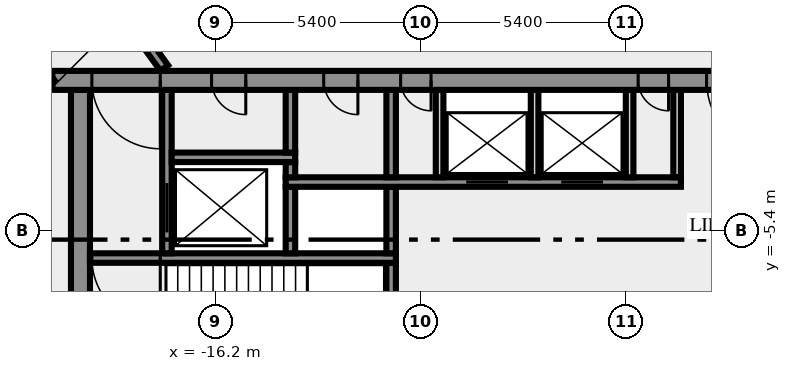
"""IFC4 building model, lengths in metres.
Left out: names, types, materials, properties, quantities, classifications, styles, units other than length and angle.
Written with IfcOpenShell. Run it as: python <this file> out.ifc"""

import sys

from ifc_helpers import new_model, si_unit, direction, frame, frame_2d, origin, place, context, subcontext, project, spatial, rectangle, extrude, element, fill, save


model = new_model("IFC4")
c1 = context("Model", 3, precision=1e-05, world=origin(), true_north=direction((0.0, 1.0)))
c2 = subcontext(c1, "Body", "Model", "MODEL_VIEW")
j1 = project(units=[si_unit("LENGTHUNIT", "METRE"), si_unit("PLANEANGLEUNIT", "RADIAN")], contexts=[c1])
p1 = place(None, origin())
s1 = spatial("IfcSite", under=j1, at=p1, CompositionType="ELEMENT")
p2 = place(p1, origin())
s2 = spatial("IfcBuilding", under=s1, at=p2, CompositionType="ELEMENT")
p3 = place(p2, frame((0.0, 0.0, 311.0)))
s3 = spatial("IfcBuildingStorey", under=s2, at=p3, CompositionType="ELEMENT", Elevation=311.0)
p4 = place(p3, frame((-19.75, -10.5, 0.0), z_axis=(0.0, 0.0, 1.0), x_axis=(0.0, 1.0, 0.0)))
e1 = element("IfcWall", 1, at=p4, inside=s3, PredefinedType="SHEAR", context=c2, shape_type="SweptSolid", body=[
    extrude(rectangle(XDim=8.8, YDim=0.5, at=frame_2d((4.4, 0.0))), origin(), (0.0, 0.0, 1.0), 3.65),
])
p5 = place(p3, frame((-11.575, -7.25, 0.0), z_axis=(0.0, 0.0, 1.0), x_axis=(0.0, 1.0, 0.0)))
e2 = element("IfcWall", 2, at=p5, inside=s3, PredefinedType="SHEAR", context=c2, shape_type="SweptSolid", body=[
    extrude(rectangle(XDim=1.0, YDim=0.25, at=frame_2d((0.5, 0.0))), origin(), (0.0, 0.0, 1.0), 3.65),
])
p6 = place(p3, frame((-11.45, -6.125, 0.0), z_axis=(0.0, 0.0, 1.0), x_axis=(-1.0, 0.0, 0.0)))
e3 = element("IfcWall", 3, at=p6, inside=s3, PredefinedType="SHEAR", context=c2, shape_type="SweptSolid", body=[
    extrude(rectangle(XDim=8.05, YDim=0.25, at=frame_2d((4.025, 0.0))), origin(), (0.0, 0.0, 1.0), 3.65),
])
p7 = place(p6, frame((6.2, 0.0, 0.0)))
e4 = element("IfcOpeningElement", 4, at=p7, cuts=e3, PredefinedType="OPENING", context=c2, shape_type="SweptSolid", body=[
    extrude(rectangle(XDim=1.8, YDim=2.1, at=frame_2d((0.9, 1.05))), frame((0.0, 0.135, 0.0), z_axis=(0.0, -1.0, 0.0), x_axis=(1.0, 0.0, 0.0)), (0.0, 0.0, 1.0), 0.27),
])
p8 = place(p3, frame((-17.475, -6.0, 0.0), z_axis=(0.0, 0.0, 1.0), x_axis=(0.0, 1.0, 0.0)))
e5 = element("IfcWall", 5, at=p8, inside=s3, PredefinedType="SHEAR", context=c2, shape_type="SweptSolid", body=[
    extrude(rectangle(XDim=4.3, YDim=0.25, at=frame_2d((2.15, 0.0))), origin(), (0.0, 0.0, 1.0), 3.65),
])
p9 = place(p8, frame((0.55, 0.0, 0.0)))
e6 = element("IfcOpeningElement", 6, at=p9, cuts=e5, PredefinedType="OPENING", context=c2, shape_type="SweptSolid", body=[
    extrude(rectangle(XDim=1.3, YDim=2.1, at=frame_2d((0.65, 1.05))), frame((0.0, 0.135, 0.0), z_axis=(0.0, -1.0, 0.0), x_axis=(1.0, 0.0, 0.0)), (0.0, 0.0, 1.0), 0.27),
])
for number, where, z_axis, x_axis in (
    (7, (-14.225, -6.0, 0.0), (0.0, 0.0, 1.0), (0.0, 1.0, 0.0)),
    (8, (-11.575, -6.0, 0.0), (0.0, 0.0, 1.0), (0.0, 1.0, 0.0)),
):
    element("IfcWall", number, at=place(p3, frame(where, z_axis=z_axis, x_axis=x_axis)), inside=s3, PredefinedType="SHEAR", context=c2, shape_type="SweptSolid", body=[
        extrude(rectangle(XDim=1.75, YDim=0.25, at=frame_2d((0.875, 0.0))), origin(), (0.0, 0.0, 1.0), 3.65),
    ])
p10 = place(p3, frame((-14.35, -4.125, 0.0), z_axis=(0.0, 0.0, 1.0), x_axis=(1.0, 0.0, 0.0)))
e9 = element("IfcWall", 9, at=p10, inside=s3, PredefinedType="SHEAR", context=c2, shape_type="SweptSolid", body=[
    extrude(rectangle(XDim=10.4, YDim=0.25, at=frame_2d((5.2, 0.0))), origin(), (0.0, 0.0, 1.0), 3.65),
])
p11 = place(p10, frame((4.75, 0.0, 0.0)))
e10 = element("IfcOpeningElement", 10, at=p11, cuts=e9, PredefinedType="OPENING", context=c2, shape_type="SweptSolid", body=[
    extrude(rectangle(XDim=1.1, YDim=2.1, at=frame_2d((0.55, 1.05))), frame((0.0, 0.135, 0.0), z_axis=(0.0, -1.0, 0.0), x_axis=(1.0, 0.0, 0.0)), (0.0, 0.0, 1.0), 0.27),
])
p12 = place(p10, frame((7.25, 0.0, 0.0)))
e11 = element("IfcOpeningElement", 11, at=p12, cuts=e9, PredefinedType="OPENING", context=c2, shape_type="SweptSolid", body=[
    extrude(rectangle(XDim=1.1, YDim=2.1, at=frame_2d((0.55, 1.05))), frame((0.0, 0.135, 0.0), z_axis=(0.0, -1.0, 0.0), x_axis=(1.0, 0.0, 0.0)), (0.0, 0.0, 1.0), 0.27),
])
p13 = place(p3, frame((-14.225, -4.0, 0.0), z_axis=(0.0, 0.0, 1.0), x_axis=(0.0, 1.0, 0.0)))
e12 = element("IfcWall", 12, at=p13, inside=s3, PredefinedType="SHEAR", context=c2, shape_type="SweptSolid", body=[
    extrude(rectangle(XDim=0.4, YDim=0.25, at=frame_2d((0.2, 0.0))), origin(), (0.0, 0.0, 1.0), 3.65),
])
p14 = place(p3, frame((-11.575, -4.0, 0.0), z_axis=(0.0, 0.0, 1.0), x_axis=(0.0, 1.0, 0.0)))
e13 = element("IfcWall", 13, at=p14, inside=s3, PredefinedType="SHEAR", context=c2, shape_type="SweptSolid", body=[
    extrude(rectangle(XDim=2.3, YDim=0.25, at=frame_2d((1.15, 0.0))), origin(), (0.0, 0.0, 1.0), 3.65),
])
for number, where, z_axis, x_axis in (
    (14, (-10.3, -4.0, 0.0), (0.0, 0.0, 1.0), (0.0, 1.0, 0.0)),
    (15, (-7.8, -4.0, 0.0), (0.0, 0.0, 1.0), (0.0, 1.0, 0.0)),
    (16, (-5.3, -4.0, 0.0), (0.0, 0.0, 1.0), (0.0, 1.0, 0.0)),
    (17, (-4.05, -4.0, 0.0), (0.0, 0.0, 1.0), (0.0, 1.0, 0.0)),
):
    element("IfcWall", number, at=place(p3, frame(where, z_axis=z_axis, x_axis=x_axis)), inside=s3, PredefinedType="SOLIDWALL", context=c2, shape_type="SweptSolid", body=[
        extrude(rectangle(XDim=2.3, YDim=0.2, at=frame_2d((1.15, 0.0))), origin(), (0.0, 0.0, 1.0), 3.65),
    ])
p15 = place(p3, frame((-17.35, -3.475, 0.0), z_axis=(0.0, 0.0, 1.0), x_axis=(1.0, 0.0, 0.0)))
e18 = element("IfcWall", 18, at=p15, inside=s3, PredefinedType="SHEAR", context=c2, shape_type="SweptSolid", body=[
    extrude(rectangle(XDim=3.25, YDim=0.25, at=frame_2d((1.625, 0.0))), origin(), (0.0, 0.0, 1.0), 3.65),
])
p16 = place(p3, frame((-14.225, -3.35, 0.0), z_axis=(0.0, 0.0, 1.0), x_axis=(0.0, 1.0, 0.0)))
e19 = element("IfcWall", 19, at=p16, inside=s3, PredefinedType="SHEAR", context=c2, shape_type="SweptSolid", body=[
    extrude(rectangle(XDim=1.65, YDim=0.25, at=frame_2d((0.825, 0.0))), origin(), (0.0, 0.0, 1.0), 3.65),
])
p17 = place(p3, frame((20.49, -1.45, 0.0), z_axis=(0.0, 0.0, 1.0), x_axis=(-1.0, 0.0, 0.0)))
e20 = element("IfcWall", 20, at=p17, inside=s3, PredefinedType="SHEAR", context=c2, shape_type="SweptSolid", body=[
    extrude(rectangle(XDim=40.98, YDim=0.5, at=frame_2d((20.49, 0.0))), origin(), (0.0, 0.0, 1.0), 3.65),
])
p18 = place(p17, frame((38.14, 0.0, 0.0)))
e21 = element("IfcOpeningElement", 21, at=p18, cuts=e20, PredefinedType="OPENING", context=c2, shape_type="SweptSolid", body=[
    extrude(rectangle(XDim=1.8, YDim=2.1, at=frame_2d((0.9, 1.05))), frame((0.0, 0.26, 0.0), z_axis=(0.0, -1.0, 0.0), x_axis=(1.0, 0.0, 0.0)), (0.0, 0.0, 1.0), 0.52),
])
p19 = place(p17, frame((35.89, 0.0, 0.0)))
e22 = element("IfcOpeningElement", 22, at=p19, cuts=e20, PredefinedType="OPENING", context=c2, shape_type="SweptSolid", body=[
    extrude(rectangle(XDim=0.9, YDim=2.1, at=frame_2d((0.45, 1.05))), frame((0.0, 0.26, 0.0), z_axis=(0.0, -1.0, 0.0), x_axis=(1.0, 0.0, 0.0)), (0.0, 0.0, 1.0), 0.52),
])
p20 = place(p17, frame((32.94, 0.0, 0.0)))
e23 = element("IfcOpeningElement", 23, at=p20, cuts=e20, PredefinedType="OPENING", context=c2, shape_type="SweptSolid", body=[
    extrude(rectangle(XDim=0.9, YDim=2.1, at=frame_2d((0.45, 1.05))), frame((0.0, 0.26, 0.0), z_axis=(0.0, -1.0, 0.0), x_axis=(1.0, 0.0, 0.0)), (0.0, 0.0, 1.0), 0.52),
])
p21 = place(p17, frame((31.015, 0.0, 0.0)))
e24 = element("IfcOpeningElement", 24, at=p21, cuts=e20, PredefinedType="OPENING", context=c2, shape_type="SweptSolid", body=[
    extrude(rectangle(XDim=0.8, YDim=2.1, at=frame_2d((0.4, 1.05))), frame((0.0, 0.26, 0.0), z_axis=(0.0, -1.0, 0.0), x_axis=(1.0, 0.0, 0.0)), (0.0, 0.0, 1.0), 0.52),
])
p22 = place(p17, frame((24.765, 0.0, 0.0)))
e25 = element("IfcOpeningElement", 25, at=p22, cuts=e20, PredefinedType="OPENING", context=c2, shape_type="SweptSolid", body=[
    extrude(rectangle(XDim=0.8, YDim=2.1, at=frame_2d((0.4, 1.05))), frame((0.0, 0.26, 0.0), z_axis=(0.0, -1.0, 0.0), x_axis=(1.0, 0.0, 0.0)), (0.0, 0.0, 1.0), 0.52),
])
p23 = place(p17, frame((21.765, 0.0, 0.0)))
e26 = element("IfcOpeningElement", 26, at=p23, cuts=e20, PredefinedType="OPENING", context=c2, shape_type="SweptSolid", body=[
    extrude(rectangle(XDim=2.0, YDim=2.1, at=frame_2d((1.0, 1.05))), frame((0.0, 0.26, 0.0), z_axis=(0.0, -1.0, 0.0), x_axis=(1.0, 0.0, 0.0)), (0.0, 0.0, 1.0), 0.52),
])
p24 = place(p17, frame((12.24, 0.0, 0.0)))
e27 = element("IfcOpeningElement", 27, at=p24, cuts=e20, PredefinedType="OPENING", context=c2, shape_type="SweptSolid", body=[
    extrude(rectangle(XDim=0.9, YDim=2.1, at=frame_2d((0.45, 1.05))), frame((0.0, 0.26, 0.0), z_axis=(0.0, -1.0, 0.0), x_axis=(1.0, 0.0, 0.0)), (0.0, 0.0, 1.0), 0.52),
])
p25 = place(p17, frame((7.14, 0.0, 0.0)))
e28 = element("IfcOpeningElement", 28, at=p25, cuts=e20, PredefinedType="OPENING", context=c2, shape_type="SweptSolid", body=[
    extrude(rectangle(XDim=0.9, YDim=2.1, at=frame_2d((0.45, 1.05))), frame((0.0, 0.26, 0.0), z_axis=(0.0, -1.0, 0.0), x_axis=(1.0, 0.0, 0.0)), (0.0, 0.0, 1.0), 0.52),
])
p26 = place(p17, frame((5.028, 0.0, 0.0)))
e29 = element("IfcOpeningElement", 29, at=p26, cuts=e20, PredefinedType="OPENING", context=c2, shape_type="SweptSolid", body=[
    extrude(rectangle(XDim=0.8, YDim=2.1, at=frame_2d((0.4, 1.05))), frame((0.0, 0.26, 0.0), z_axis=(0.0, -1.0, 0.0), x_axis=(1.0, 0.0, 0.0)), (0.0, 0.0, 1.0), 0.52),
])
p27 = place(p17, frame((3.452, 0.0, 0.0)))
e30 = element("IfcOpeningElement", 30, at=p27, cuts=e20, PredefinedType="OPENING", context=c2, shape_type="SweptSolid", body=[
    extrude(rectangle(XDim=0.8, YDim=2.1, at=frame_2d((0.4, 1.05))), frame((0.0, 0.26, 0.0), z_axis=(0.0, -1.0, 0.0), x_axis=(1.0, 0.0, 0.0)), (0.0, 0.0, 1.0), 0.52),
])
p28 = place(p17, frame((1.04, 0.0, 0.0)))
e31 = element("IfcOpeningElement", 31, at=p28, cuts=e20, PredefinedType="OPENING", context=c2, shape_type="SweptSolid", body=[
    extrude(rectangle(XDim=1.8, YDim=2.1, at=frame_2d((0.9, 1.05))), frame((0.0, 0.26, 0.0), z_axis=(0.0, -1.0, 0.0), x_axis=(1.0, 0.0, 0.0)), (0.0, 0.0, 1.0), 0.52),
])
p29 = place(p3, frame((-20.531, -1.523, 0.0), z_axis=(0.0, 0.0, 1.0), x_axis=(-0.587785867777, 0.809016547199, 0.0)))
e32 = element("IfcWall", 32, at=p29, inside=s3, PredefinedType="SOLIDWALL", context=c2, shape_type="SweptSolid", body=[
    extrude(rectangle(XDim=16.67, YDim=0.25, at=frame_2d((8.335, 0.0))), origin(), (0.0, 0.0, 1.0), 3.65),
])
p30 = place(p29, frame((15.296, 0.0, 0.0)))
e33 = element("IfcOpeningElement", 33, at=p30, cuts=e32, PredefinedType="OPENING", context=c2, shape_type="SweptSolid", body=[
    extrude(rectangle(XDim=0.9, YDim=2.1, at=frame_2d((0.45, 1.05))), frame((0.0, 0.135, 0.0), z_axis=(0.0, -1.0, 0.0), x_axis=(1.0, 0.0, 0.0)), (0.0, 0.0, 1.0), 0.27),
])
p31 = place(p3, frame((-28.039, 13.319, 0.0), z_axis=(0.0, 0.0, 1.0), x_axis=(0.587791911753, -0.809012155952, 0.0)))
e34 = element("IfcWall", 34, at=p31, inside=s3, PredefinedType="SOLIDWALL", context=c2, shape_type="SweptSolid", body=[
    extrude(rectangle(XDim=17.853, YDim=0.25, at=frame_2d((8.927, 0.0))), origin(), (0.0, 0.0, 1.0), 3.65),
])
p32 = place(p31, frame((13.512, 0.0, 0.0)))
e35 = element("IfcOpeningElement", 35, at=p32, cuts=e34, PredefinedType="OPENING", context=c2, shape_type="SweptSolid", body=[
    extrude(rectangle(XDim=0.9, YDim=2.1, at=frame_2d((0.45, 1.05))), frame((0.0, 0.135, 0.0), z_axis=(0.0, -1.0, 0.0), x_axis=(1.0, 0.0, 0.0)), (0.0, 0.0, 1.0), 0.27),
])
p33 = place(p7, origin())
e36 = element("IfcDoor", 36, at=p33, inside=s3, OperationType="DOUBLE_DOOR_SINGLE_SWING", PredefinedType="DOOR", context=c2, shape_type="SweptSolid", body=[
    extrude(rectangle(XDim=1.8, YDim=2.1, at=frame_2d((0.9, 1.05))), frame((0.0, 0.025, 0.0), z_axis=(0.0, -1.0, 0.0), x_axis=(1.0, 0.0, 0.0)), (0.0, 0.0, 1.0), 0.05),
])
fill(e4, e36)
p34 = place(p9, origin())
e37 = element("IfcDoor", 37, at=p34, inside=s3, OperationType="DOUBLE_DOOR_SLIDING", PredefinedType="DOOR", context=c2, shape_type="SweptSolid", body=[
    extrude(rectangle(XDim=1.3, YDim=2.1, at=frame_2d((0.65, 1.05))), frame((0.0, 0.025, 0.0), z_axis=(0.0, -1.0, 0.0), x_axis=(1.0, 0.0, 0.0)), (0.0, 0.0, 1.0), 0.05),
])
fill(e6, e37)
p35 = place(p11, origin())
e38 = element("IfcDoor", 38, at=p35, inside=s3, OperationType="DOUBLE_DOOR_SLIDING", PredefinedType="DOOR", context=c2, shape_type="SweptSolid", body=[
    extrude(rectangle(XDim=1.1, YDim=2.1, at=frame_2d((0.55, 1.05))), frame((0.0, 0.025, 0.0), z_axis=(0.0, -1.0, 0.0), x_axis=(1.0, 0.0, 0.0)), (0.0, 0.0, 1.0), 0.05),
])
fill(e10, e38)
p36 = place(p12, origin())
e39 = element("IfcDoor", 39, at=p36, inside=s3, OperationType="DOUBLE_DOOR_SLIDING", PredefinedType="DOOR", context=c2, shape_type="SweptSolid", body=[
    extrude(rectangle(XDim=1.1, YDim=2.1, at=frame_2d((0.55, 1.05))), frame((0.0, 0.025, 0.0), z_axis=(0.0, -1.0, 0.0), x_axis=(1.0, 0.0, 0.0)), (0.0, 0.0, 1.0), 0.05),
])
fill(e11, e39)
p37 = place(p18, origin())
e40 = element("IfcDoor", 40, at=p37, inside=s3, OperationType="DOUBLE_DOOR_SINGLE_SWING", PredefinedType="DOOR", context=c2, shape_type="SweptSolid", body=[
    extrude(rectangle(XDim=1.8, YDim=2.1, at=frame_2d((0.9, 1.05))), frame((0.0, 0.025, 0.0), z_axis=(0.0, -1.0, 0.0), x_axis=(1.0, 0.0, 0.0)), (0.0, 0.0, 1.0), 0.05),
])
fill(e21, e40)
p38 = place(p19, origin())
e41 = element("IfcDoor", 41, at=p38, inside=s3, OperationType="SINGLE_SWING_RIGHT", PredefinedType="DOOR", context=c2, shape_type="SweptSolid", body=[
    extrude(rectangle(XDim=0.9, YDim=2.1, at=frame_2d((0.45, 1.05))), frame((0.0, 0.025, 0.0), z_axis=(0.0, -1.0, 0.0), x_axis=(1.0, 0.0, 0.0)), (0.0, 0.0, 1.0), 0.05),
])
fill(e22, e41)
p39 = place(p20, origin())
e42 = element("IfcDoor", 42, at=p39, inside=s3, OperationType="SINGLE_SWING_RIGHT", PredefinedType="DOOR", context=c2, shape_type="SweptSolid", body=[
    extrude(rectangle(XDim=0.9, YDim=2.1, at=frame_2d((0.45, 1.05))), frame((0.0, 0.025, 0.0), z_axis=(0.0, -1.0, 0.0), x_axis=(1.0, 0.0, 0.0)), (0.0, 0.0, 1.0), 0.05),
])
fill(e23, e42)
p40 = place(p21, origin())
e43 = element("IfcDoor", 43, at=p40, inside=s3, OperationType="SINGLE_SWING_RIGHT", PredefinedType="DOOR", context=c2, shape_type="SweptSolid", body=[
    extrude(rectangle(XDim=0.8, YDim=2.1, at=frame_2d((0.4, 1.05))), frame((0.0, 0.025, 0.0), z_axis=(0.0, -1.0, 0.0), x_axis=(1.0, 0.0, 0.0)), (0.0, 0.0, 1.0), 0.05),
])
fill(e24, e43)
p41 = place(p22, origin())
e44 = element("IfcDoor", 44, at=p41, inside=s3, OperationType="SINGLE_SWING_RIGHT", PredefinedType="DOOR", context=c2, shape_type="SweptSolid", body=[
    extrude(rectangle(XDim=0.8, YDim=2.1, at=frame_2d((0.4, 1.05))), frame((0.0, 0.025, 0.0), z_axis=(0.0, -1.0, 0.0), x_axis=(1.0, 0.0, 0.0)), (0.0, 0.0, 1.0), 0.05),
])
fill(e25, e44)
p42 = place(p23, origin())
e45 = element("IfcDoor", 45, at=p42, inside=s3, OperationType="DOUBLE_DOOR_SINGLE_SWING", PredefinedType="DOOR", context=c2, shape_type="SweptSolid", body=[
    extrude(rectangle(XDim=2.0, YDim=2.1, at=frame_2d((1.0, 1.05))), frame((0.0, 0.025, 0.0), z_axis=(0.0, -1.0, 0.0), x_axis=(1.0, 0.0, 0.0)), (0.0, 0.0, 1.0), 0.05),
])
fill(e26, e45)
save(model, sys.argv[1])
